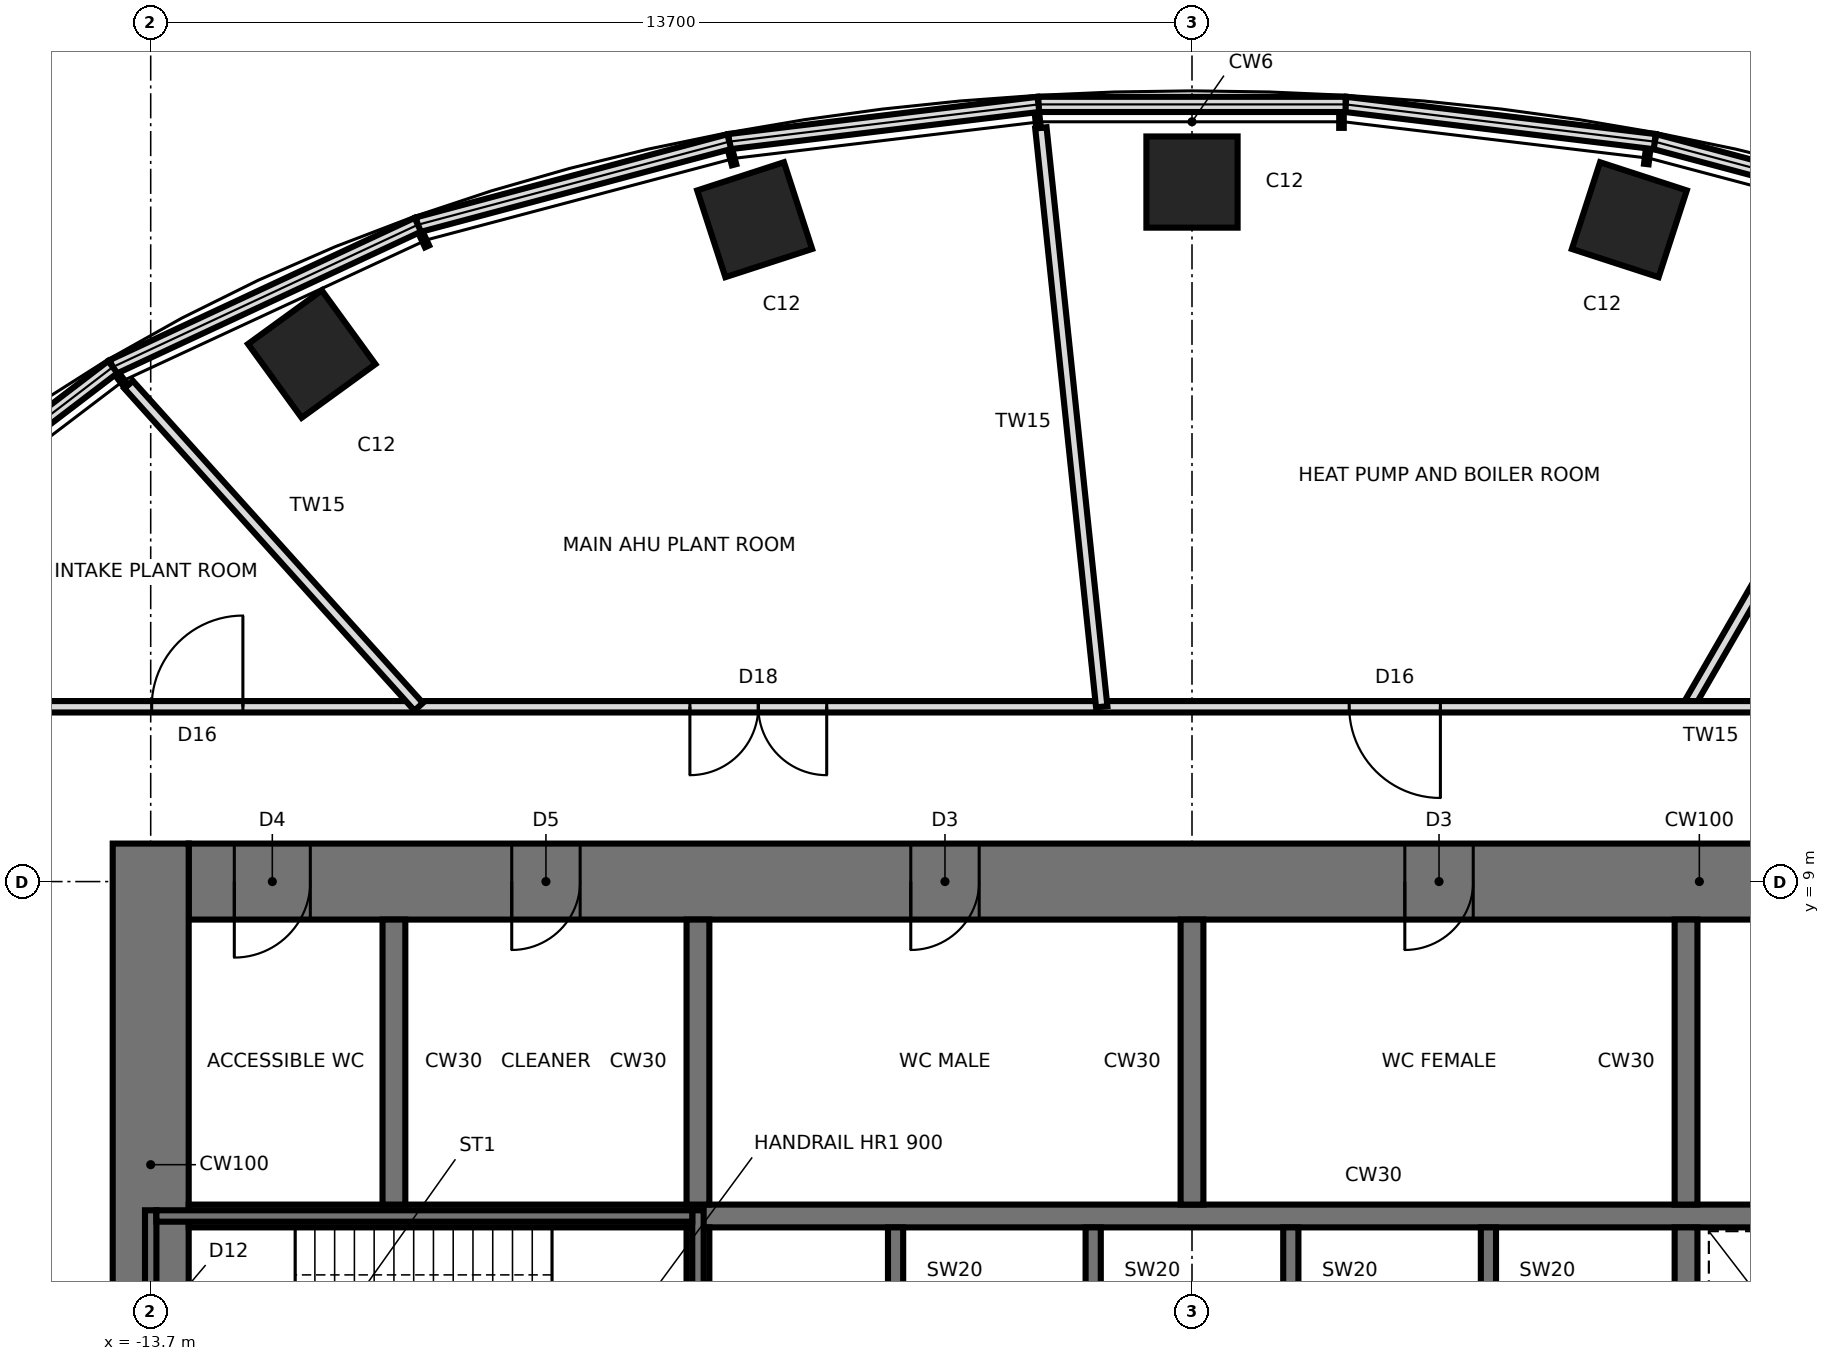
"""IFC4 building model, lengths in metres.
Left out: names, types, materials, properties, quantities, classifications, styles, units other than length and angle.
Written with IfcOpenShell. Run it as: python <this file> out.ifc"""

import sys

from ifc_helpers import new_model, si_unit, direction, frame, frame_2d, origin, origin_2d, place, context, subcontext, project, spatial, rectangle, extrude, element, fill, save


model = new_model("IFC4")
c1 = context("Model", 3, precision=1e-05, world=origin(), true_north=direction((0.0, 1.0)))
c2 = subcontext(c1, "Body", "Model", "MODEL_VIEW")
j1 = project(units=[si_unit("LENGTHUNIT", "METRE"), si_unit("PLANEANGLEUNIT", "RADIAN")], contexts=[c1])
p1 = place(None, origin())
s1 = spatial("IfcSite", under=j1, at=p1, CompositionType="ELEMENT")
p2 = place(p1, origin())
s2 = spatial("IfcBuilding", under=s1, at=p2, CompositionType="ELEMENT")
p3 = place(p2, frame((0.0, 0.0, 277.0)))
s3 = spatial("IfcBuildingStorey", under=s2, at=p3, CompositionType="ELEMENT", Elevation=277.0)
for number, where, z_axis, x_axis in (
    (1, (5.754, 17.708, 0.0), (0.0, 0.0, 1.0), (0.309, 0.951, 0.0)),
    (2, (0.0, 18.204, 0.0), (0.0, 0.0, 1.0), (0.0, 1.0, 0.0)),
    (3, (-5.754, 17.708, 0.0), (0.0, 0.0, 1.0), (-0.309, 0.951, 0.0)),
    (4, (-11.581, 15.94, 0.0), (0.0, 0.0, 1.0), (-0.588, 0.809, 0.0)),
):
    element("IfcColumn", number, at=place(p3, frame(where, z_axis=z_axis, x_axis=x_axis)), inside=s3, PredefinedType="COLUMN", context=c2, shape_type="SweptSolid", body=[
        extrude(rectangle(XDim=1.2, YDim=1.2, at=origin_2d()), origin(), (0.0, 0.0, 1.0), 5.0),
    ])
p4 = place(p3, frame((13.2, 9.0, 0.0), z_axis=(0.0, 0.0, 1.0), x_axis=(-1.0, 0.0, 0.0)))
e5 = element("IfcWall", 5, at=p4, inside=s3, PredefinedType="SHEAR", context=c2, shape_type="SweptSolid", body=[
    extrude(rectangle(XDim=26.4, YDim=1.0, at=frame_2d((13.2, 0.0))), origin(), (0.0, 0.0, 1.0), 5.0),
])
p5 = place(p4, frame((2.65, 0.0, 0.0)))
e6 = element("IfcOpeningElement", 6, at=p5, cuts=e5, PredefinedType="OPENING", context=c2, shape_type="SweptSolid", body=[
    extrude(rectangle(XDim=0.9, YDim=2.1, at=frame_2d((0.45, 1.05))), frame((0.0, 0.51, 0.0), z_axis=(0.0, -1.0, 0.0), x_axis=(1.0, 0.0, 0.0)), (0.0, 0.0, 1.0), 1.02),
])
p6 = place(p4, frame((9.5, 0.0, 0.0)))
e7 = element("IfcOpeningElement", 7, at=p6, cuts=e5, PredefinedType="OPENING", context=c2, shape_type="SweptSolid", body=[
    extrude(rectangle(XDim=0.9, YDim=2.1, at=frame_2d((0.45, 1.05))), frame((0.0, 0.51, 0.0), z_axis=(0.0, -1.0, 0.0), x_axis=(1.0, 0.0, 0.0)), (0.0, 0.0, 1.0), 1.02),
])
p7 = place(p4, frame((16.0, 0.0, 0.0)))
e8 = element("IfcOpeningElement", 8, at=p7, cuts=e5, PredefinedType="OPENING", context=c2, shape_type="SweptSolid", body=[
    extrude(rectangle(XDim=0.9, YDim=2.1, at=frame_2d((0.45, 1.05))), frame((0.0, 0.51, 0.0), z_axis=(0.0, -1.0, 0.0), x_axis=(1.0, 0.0, 0.0)), (0.0, 0.0, 1.0), 1.02),
])
p8 = place(p4, frame((21.25, 0.0, 0.0)))
e9 = element("IfcOpeningElement", 9, at=p8, cuts=e5, PredefinedType="OPENING", context=c2, shape_type="SweptSolid", body=[
    extrude(rectangle(XDim=0.9, YDim=2.1, at=frame_2d((0.45, 1.05))), frame((0.0, 0.51, 0.0), z_axis=(0.0, -1.0, 0.0), x_axis=(1.0, 0.0, 0.0)), (0.0, 0.0, 1.0), 1.02),
])
p9 = place(p4, frame((24.8, 0.0, 0.0)))
e10 = element("IfcOpeningElement", 10, at=p9, cuts=e5, PredefinedType="OPENING", context=c2, shape_type="SweptSolid", body=[
    extrude(rectangle(XDim=1.0, YDim=2.1, at=frame_2d((0.5, 1.05))), frame((0.0, 0.51, 0.0), z_axis=(0.0, -1.0, 0.0), x_axis=(1.0, 0.0, 0.0)), (0.0, 0.0, 1.0), 1.02),
])
p10 = place(p3, frame((-13.7, 9.5, 0.0), z_axis=(0.0, 0.0, 1.0), x_axis=(0.0, -1.0, 0.0)))
e11 = element("IfcWall", 11, at=p10, inside=s3, PredefinedType="SHEAR", context=c2, shape_type="SweptSolid", body=[
    extrude(rectangle(XDim=19.0, YDim=1.0, at=frame_2d((9.5, 0.0))), origin(), (0.0, 0.0, 1.0), 5.0),
])
p11 = place(p10, frame((8.6, 0.0, 0.0)))
e12 = element("IfcOpeningElement", 12, at=p11, cuts=e11, PredefinedType="OPENING", context=c2, shape_type="SweptSolid", body=[
    extrude(rectangle(XDim=1.8, YDim=2.4, at=frame_2d((0.9, 1.2))), frame((0.0, 0.51, 0.0), z_axis=(0.0, -1.0, 0.0), x_axis=(1.0, 0.0, 0.0)), (0.0, 0.0, 1.0), 1.02),
])
p12 = place(p3, frame((-13.2, 4.6, 0.0), z_axis=(0.0, 0.0, 1.0), x_axis=(1.0, 0.0, 0.0)))
e13 = element("IfcWall", 13, at=p12, inside=s3, PredefinedType="SHEAR", context=c2, shape_type="SweptSolid", body=[
    extrude(rectangle(XDim=26.4, YDim=0.3, at=frame_2d((13.2, 0.0))), origin(), (0.0, 0.0, 1.0), 5.0),
])
p13 = place(p3, frame((-6.5, 1.75, 0.0), z_axis=(0.0, 0.0, 1.0), x_axis=(0.0, 1.0, 0.0)))
e14 = element("IfcWall", 14, at=p13, inside=s3, PredefinedType="SHEAR", context=c2, shape_type="SweptSolid", body=[
    extrude(rectangle(XDim=2.7, YDim=0.3, at=frame_2d((1.35, 0.0))), origin(), (0.0, 0.0, 1.0), 5.0),
])
p14 = place(p3, frame((-6.5, 4.75, 0.0), z_axis=(0.0, 0.0, 1.0), x_axis=(0.0, 1.0, 0.0)))
e15 = element("IfcWall", 15, at=p14, inside=s3, PredefinedType="SHEAR", context=c2, shape_type="SweptSolid", body=[
    extrude(rectangle(XDim=3.75, YDim=0.3, at=frame_2d((1.875, 0.0))), origin(), (0.0, 0.0, 1.0), 5.0),
])
p15 = place(p3, frame((6.5, 1.75, 0.0), z_axis=(0.0, 0.0, 1.0), x_axis=(0.0, 1.0, 0.0)))
e16 = element("IfcWall", 16, at=p15, inside=s3, PredefinedType="SHEAR", context=c2, shape_type="SweptSolid", body=[
    extrude(rectangle(XDim=2.7, YDim=0.3, at=frame_2d((1.35, 0.0))), origin(), (0.0, 0.0, 1.0), 5.0),
])
p16 = place(p3, frame((6.5, 4.75, 0.0), z_axis=(0.0, 0.0, 1.0), x_axis=(0.0, 1.0, 0.0)))
e17 = element("IfcWall", 17, at=p16, inside=s3, PredefinedType="SHEAR", context=c2, shape_type="SweptSolid", body=[
    extrude(rectangle(XDim=3.75, YDim=0.3, at=frame_2d((1.875, 0.0))), origin(), (0.0, 0.0, 1.0), 5.0),
])
for number, where, z_axis, x_axis in (
    (18, (-3.9, 1.75, 0.0), (0.0, 0.0, 1.0), (0.0, 1.0, 0.0)),
    (19, (-1.3, 1.75, 0.0), (0.0, 0.0, 1.0), (0.0, 1.0, 0.0)),
    (20, (1.3, 1.75, 0.0), (0.0, 0.0, 1.0), (0.0, 1.0, 0.0)),
    (21, (3.9, 1.75, 0.0), (0.0, 0.0, 1.0), (0.0, 1.0, 0.0)),
):
    element("IfcWall", number, at=place(p3, frame(where, z_axis=z_axis, x_axis=x_axis)), inside=s3, PredefinedType="SHEAR", context=c2, shape_type="SweptSolid", body=[
        extrude(rectangle(XDim=2.7, YDim=0.2, at=frame_2d((1.35, 0.0))), origin(), (0.0, 0.0, 1.0), 5.0),
    ])
for number, where, z_axis, x_axis in (
    (22, (0.0, 4.75, 0.0), (0.0, 0.0, 1.0), (0.0, 1.0, 0.0)),
    (23, (-10.5, 4.75, 0.0), (0.0, 0.0, 1.0), (0.0, 1.0, 0.0)),
):
    element("IfcWall", number, at=place(p3, frame(where, z_axis=z_axis, x_axis=x_axis)), inside=s3, PredefinedType="SHEAR", context=c2, shape_type="SweptSolid", body=[
        extrude(rectangle(XDim=3.75, YDim=0.3, at=frame_2d((1.875, 0.0))), origin(), (0.0, 0.0, 1.0), 5.0),
    ])
p17 = place(p3, frame((10.186, 17.642, 5.0), z_axis=(0.0, 0.0, 1.0), x_axis=(-0.96617759257, 0.257877605881, 0.0)))
e24 = element("IfcWall", 24, at=p17, inside=s3, PredefinedType="PARAPET", context=c2, shape_type="SweptSolid", body=[
    extrude(rectangle(XDim=4.241, YDim=0.2, at=frame_2d((2.121, 0.0))), origin(), (0.0, 0.0, 1.0), 0.4),
])
p18 = place(p3, frame((6.088, 18.736, 5.0), z_axis=(0.0, 0.0, 1.0), x_axis=(-0.99282711648, 0.119558842338, 0.0)))
e25 = element("IfcWall", 25, at=p18, inside=s3, PredefinedType="PARAPET", context=c2, shape_type="SweptSolid", body=[
    extrude(rectangle(XDim=4.096, YDim=0.2, at=frame_2d((2.048, 0.0))), origin(), (0.0, 0.0, 1.0), 0.4),
])
p19 = place(p3, frame((2.021, 19.226, 5.0), z_axis=(0.0, 0.0, 1.0), x_axis=(-1.0, 0.0, 0.0)))
e26 = element("IfcWall", 26, at=p19, inside=s3, PredefinedType="PARAPET", context=c2, shape_type="SweptSolid", body=[
    extrude(rectangle(XDim=4.042, YDim=0.2, at=frame_2d((2.021, 0.0))), origin(), (0.0, 0.0, 1.0), 0.4),
])
p20 = place(p3, frame((-2.021, 19.226, 5.0), z_axis=(0.0, 0.0, 1.0), x_axis=(-0.99282711648, -0.119558842338, 0.0)))
e27 = element("IfcWall", 27, at=p20, inside=s3, PredefinedType="PARAPET", context=c2, shape_type="SweptSolid", body=[
    extrude(rectangle(XDim=4.096, YDim=0.2, at=frame_2d((2.048, 0.0))), origin(), (0.0, 0.0, 1.0), 0.4),
])
p21 = place(p3, frame((-6.088, 18.736, 5.0), z_axis=(0.0, 0.0, 1.0), x_axis=(-0.96617759257, -0.257877605881, 0.0)))
e28 = element("IfcWall", 28, at=p21, inside=s3, PredefinedType="PARAPET", context=c2, shape_type="SweptSolid", body=[
    extrude(rectangle(XDim=4.241, YDim=0.2, at=frame_2d((2.121, 0.0))), origin(), (0.0, 0.0, 1.0), 0.4),
])
p22 = place(p3, frame((-10.186, 17.642, 5.0), z_axis=(0.0, 0.0, 1.0), x_axis=(-0.906246502857, -0.422749661217, 0.0)))
e29 = element("IfcWall", 29, at=p22, inside=s3, PredefinedType="PARAPET", context=c2, shape_type="SweptSolid", body=[
    extrude(rectangle(XDim=4.429, YDim=0.2, at=frame_2d((2.214, 0.0))), origin(), (0.0, 0.0, 1.0), 0.4),
])
p23 = place(p3, frame((-14.199, 15.77, 5.0), z_axis=(0.0, 0.0, 1.0), x_axis=(-0.794855686591, -0.606798514743, 0.0)))
e30 = element("IfcWall", 30, at=p23, inside=s3, PredefinedType="PARAPET", context=c2, shape_type="SweptSolid", body=[
    extrude(rectangle(XDim=4.605, YDim=0.2, at=frame_2d((2.302, 0.0))), origin(), (0.0, 0.0, 1.0), 0.4),
])
p24 = place(p3, frame((6.524, 11.3, 0.0), z_axis=(0.0, 0.0, 1.0), x_axis=(0.4999806097, 0.86603659849, 0.0)))
e31 = element("IfcWall", 31, at=p24, inside=s3, PredefinedType="PARTITIONING", context=c2, shape_type="SweptSolid", body=[
    extrude(rectangle(XDim=7.013, YDim=0.15, at=frame_2d((3.506, 0.0))), origin(), (0.0, 0.0, 1.0), 4.75),
])
p25 = place(p3, frame((16.0, 11.3, 0.0), z_axis=(0.0, 0.0, 1.0), x_axis=(-1.0, 0.0, 0.0)))
e32 = element("IfcWall", 32, at=p25, inside=s3, PredefinedType="PARTITIONING", context=c2, shape_type="SweptSolid", body=[
    extrude(rectangle(XDim=32.0, YDim=0.15, at=frame_2d((16.0, 0.0))), origin(), (0.0, 0.0, 1.0), 4.75),
])
p26 = place(p25, frame((3.813, 0.0, 0.0)))
e33 = element("IfcOpeningElement", 33, at=p26, cuts=e32, PredefinedType="OPENING", context=c2, shape_type="SweptSolid", body=[
    extrude(rectangle(XDim=1.8, YDim=2.4, at=frame_2d((0.9, 1.2))), frame((0.0, 0.085, 0.0), z_axis=(0.0, -1.0, 0.0), x_axis=(1.0, 0.0, 0.0)), (0.0, 0.0, 1.0), 0.17),
])
p27 = place(p25, frame((12.732, 0.0, 0.0)))
e34 = element("IfcOpeningElement", 34, at=p27, cuts=e32, PredefinedType="OPENING", context=c2, shape_type="SweptSolid", body=[
    extrude(rectangle(XDim=1.2, YDim=2.1, at=frame_2d((0.6, 1.05))), frame((0.0, 0.085, 0.0), z_axis=(0.0, -1.0, 0.0), x_axis=(1.0, 0.0, 0.0)), (0.0, 0.0, 1.0), 0.17),
])
p28 = place(p25, frame((20.806, 0.0, 0.0)))
e35 = element("IfcOpeningElement", 35, at=p28, cuts=e32, PredefinedType="OPENING", context=c2, shape_type="SweptSolid", body=[
    extrude(rectangle(XDim=1.8, YDim=2.4, at=frame_2d((0.9, 1.2))), frame((0.0, 0.085, 0.0), z_axis=(0.0, -1.0, 0.0), x_axis=(1.0, 0.0, 0.0)), (0.0, 0.0, 1.0), 0.17),
])
p29 = place(p25, frame((28.487, 0.0, 0.0)))
e36 = element("IfcOpeningElement", 36, at=p29, cuts=e32, PredefinedType="OPENING", context=c2, shape_type="SweptSolid", body=[
    extrude(rectangle(XDim=1.2, YDim=2.1, at=frame_2d((0.6, 1.05))), frame((0.0, 0.085, 0.0), z_axis=(0.0, -1.0, 0.0), x_axis=(1.0, 0.0, 0.0)), (0.0, 0.0, 1.0), 0.17),
])
p30 = place(p3, frame((-1.188, 11.3, 0.0), z_axis=(0.0, 0.0, 1.0), x_axis=(-0.10451720061, 0.994523079057, 0.0)))
e37 = element("IfcWall", 37, at=p30, inside=s3, PredefinedType="PARTITIONING", context=c2, shape_type="SweptSolid", body=[
    extrude(rectangle(XDim=7.659, YDim=0.15, at=frame_2d((3.83, 0.0))), origin(), (0.0, 0.0, 1.0), 4.75),
])
p31 = place(p3, frame((-10.175, 11.3, 0.0), z_axis=(0.0, 0.0, 1.0), x_axis=(-0.669139686494, 0.743136649586, 0.0)))
e38 = element("IfcWall", 38, at=p31, inside=s3, PredefinedType="PARTITIONING", context=c2, shape_type="SweptSolid", body=[
    extrude(rectangle(XDim=5.705, YDim=0.15, at=frame_2d((2.852, 0.0))), origin(), (0.0, 0.0, 1.0), 4.75),
])
p32 = place(p3, frame((-13.7, 1.525, 5.0), z_axis=(0.0, 0.0, 1.0), x_axis=(0.0, 1.0, 0.0)))
e39 = element("IfcWall", 39, at=p32, inside=s3, PredefinedType="SOLIDWALL", context=c2, shape_type="SweptSolid", body=[
    extrude(rectangle(XDim=3.15, YDim=0.15, at=frame_2d((1.575, 0.0))), origin(), (0.0, 0.0, 1.0), 2.82),
])
p33 = place(p32, frame((0.975, 0.0, 0.0)))
e40 = element("IfcOpeningElement", 40, at=p33, cuts=e39, PredefinedType="OPENING", context=c2, shape_type="SweptSolid", body=[
    extrude(rectangle(XDim=1.2, YDim=2.1, at=frame_2d((0.6, 1.05))), frame((0.0, 0.085, 0.0), z_axis=(0.0, -1.0, 0.0), x_axis=(1.0, 0.0, 0.0)), (0.0, 0.0, 1.0), 0.17),
])
p34 = place(p3, frame((-6.5, 1.525, 5.0), z_axis=(0.0, 0.0, 1.0), x_axis=(0.0, 1.0, 0.0)))
e41 = element("IfcWall", 41, at=p34, inside=s3, PredefinedType="SOLIDWALL", context=c2, shape_type="SweptSolid", body=[
    extrude(rectangle(XDim=3.15, YDim=0.15, at=frame_2d((1.575, 0.0))), origin(), (0.0, 0.0, 1.0), 2.82),
])
p35 = place(p3, frame((-13.625, 4.6, 5.0), z_axis=(0.0, 0.0, 1.0), x_axis=(1.0, 0.0, 0.0)))
e42 = element("IfcWall", 42, at=p35, inside=s3, PredefinedType="SOLIDWALL", context=c2, shape_type="SweptSolid", body=[
    extrude(rectangle(XDim=7.05, YDim=0.15, at=frame_2d((3.525, 0.0))), origin(), (0.0, 0.0, 1.0), 2.82),
])
p36 = place(p6, origin())
e43 = element("IfcDoor", 43, at=p36, inside=s3, OperationType="SINGLE_SWING_RIGHT", PredefinedType="DOOR", context=c2, shape_type="SweptSolid", body=[
    extrude(rectangle(XDim=0.82, YDim=2.06, at=frame_2d((0.45, 1.03))), frame((0.0, 0.025, 0.0), z_axis=(0.0, -1.0, 0.0), x_axis=(1.0, 0.0, 0.0)), (0.0, 0.0, 1.0), 0.05),
    extrude(rectangle(XDim=0.04, YDim=2.1, at=frame_2d((0.02, 1.05))), frame((0.0, 0.25, 0.0), z_axis=(0.0, -1.0, 0.0), x_axis=(1.0, 0.0, 0.0)), (0.0, 0.0, 1.0), 0.5),
    extrude(rectangle(XDim=0.04, YDim=2.1, at=frame_2d((0.88, 1.05))), frame((0.0, 0.25, 0.0), z_axis=(0.0, -1.0, 0.0), x_axis=(1.0, 0.0, 0.0)), (0.0, 0.0, 1.0), 0.5),
    extrude(rectangle(XDim=0.82, YDim=0.04, at=frame_2d((0.45, 2.08))), frame((0.0, 0.25, 0.0), z_axis=(0.0, -1.0, 0.0), x_axis=(1.0, 0.0, 0.0)), (0.0, 0.0, 1.0), 0.5),
])
fill(e7, e43)
p37 = place(p7, origin())
e44 = element("IfcDoor", 44, at=p37, inside=s3, OperationType="SINGLE_SWING_RIGHT", PredefinedType="DOOR", context=c2, shape_type="SweptSolid", body=[
    extrude(rectangle(XDim=0.82, YDim=2.06, at=frame_2d((0.45, 1.03))), frame((0.0, 0.025, 0.0), z_axis=(0.0, -1.0, 0.0), x_axis=(1.0, 0.0, 0.0)), (0.0, 0.0, 1.0), 0.05),
    extrude(rectangle(XDim=0.04, YDim=2.1, at=frame_2d((0.02, 1.05))), frame((0.0, 0.25, 0.0), z_axis=(0.0, -1.0, 0.0), x_axis=(1.0, 0.0, 0.0)), (0.0, 0.0, 1.0), 0.5),
    extrude(rectangle(XDim=0.04, YDim=2.1, at=frame_2d((0.88, 1.05))), frame((0.0, 0.25, 0.0), z_axis=(0.0, -1.0, 0.0), x_axis=(1.0, 0.0, 0.0)), (0.0, 0.0, 1.0), 0.5),
    extrude(rectangle(XDim=0.82, YDim=0.04, at=frame_2d((0.45, 2.08))), frame((0.0, 0.25, 0.0), z_axis=(0.0, -1.0, 0.0), x_axis=(1.0, 0.0, 0.0)), (0.0, 0.0, 1.0), 0.5),
])
fill(e8, e44)
p38 = place(p8, origin())
e45 = element("IfcDoor", 45, at=p38, inside=s3, OperationType="SINGLE_SWING_RIGHT", PredefinedType="DOOR", context=c2, shape_type="SweptSolid", body=[
    extrude(rectangle(XDim=0.82, YDim=2.06, at=frame_2d((0.45, 1.03))), frame((0.0, 0.025, 0.0), z_axis=(0.0, -1.0, 0.0), x_axis=(1.0, 0.0, 0.0)), (0.0, 0.0, 1.0), 0.05),
    extrude(rectangle(XDim=0.04, YDim=2.1, at=frame_2d((0.02, 1.05))), frame((0.0, 0.25, 0.0), z_axis=(0.0, -1.0, 0.0), x_axis=(1.0, 0.0, 0.0)), (0.0, 0.0, 1.0), 0.5),
    extrude(rectangle(XDim=0.04, YDim=2.1, at=frame_2d((0.88, 1.05))), frame((0.0, 0.25, 0.0), z_axis=(0.0, -1.0, 0.0), x_axis=(1.0, 0.0, 0.0)), (0.0, 0.0, 1.0), 0.5),
    extrude(rectangle(XDim=0.82, YDim=0.04, at=frame_2d((0.45, 2.08))), frame((0.0, 0.25, 0.0), z_axis=(0.0, -1.0, 0.0), x_axis=(1.0, 0.0, 0.0)), (0.0, 0.0, 1.0), 0.5),
])
fill(e9, e45)
p39 = place(p9, origin())
e46 = element("IfcDoor", 46, at=p39, inside=s3, OperationType="SINGLE_SWING_RIGHT", PredefinedType="DOOR", context=c2, shape_type="SweptSolid", body=[
    extrude(rectangle(XDim=0.92, YDim=2.06, at=frame_2d((0.5, 1.03))), frame((0.0, 0.025, 0.0), z_axis=(0.0, -1.0, 0.0), x_axis=(1.0, 0.0, 0.0)), (0.0, 0.0, 1.0), 0.05),
    extrude(rectangle(XDim=0.04, YDim=2.1, at=frame_2d((0.02, 1.05))), frame((0.0, 0.25, 0.0), z_axis=(0.0, -1.0, 0.0), x_axis=(1.0, 0.0, 0.0)), (0.0, 0.0, 1.0), 0.5),
    extrude(rectangle(XDim=0.04, YDim=2.1, at=frame_2d((0.98, 1.05))), frame((0.0, 0.25, 0.0), z_axis=(0.0, -1.0, 0.0), x_axis=(1.0, 0.0, 0.0)), (0.0, 0.0, 1.0), 0.5),
    extrude(rectangle(XDim=0.92, YDim=0.04, at=frame_2d((0.5, 2.08))), frame((0.0, 0.25, 0.0), z_axis=(0.0, -1.0, 0.0), x_axis=(1.0, 0.0, 0.0)), (0.0, 0.0, 1.0), 0.5),
])
fill(e10, e46)
p40 = place(p27, origin())
e47 = element("IfcDoor", 47, at=p40, inside=s3, OperationType="SINGLE_SWING_LEFT", PredefinedType="DOOR", context=c2, shape_type="SweptSolid", body=[
    extrude(rectangle(XDim=1.2, YDim=2.1, at=frame_2d((0.6, 1.05))), frame((0.0, 0.025, 0.0), z_axis=(0.0, -1.0, 0.0), x_axis=(1.0, 0.0, 0.0)), (0.0, 0.0, 1.0), 0.05),
])
fill(e34, e47)
p41 = place(p28, origin())
e48 = element("IfcDoor", 48, at=p41, inside=s3, OperationType="DOUBLE_DOOR_SINGLE_SWING", PredefinedType="DOOR", context=c2, shape_type="SweptSolid", body=[
    extrude(rectangle(XDim=1.8, YDim=2.4, at=frame_2d((0.9, 1.2))), frame((0.0, 0.025, 0.0), z_axis=(0.0, -1.0, 0.0), x_axis=(1.0, 0.0, 0.0)), (0.0, 0.0, 1.0), 0.05),
])
fill(e35, e48)
p42 = place(p29, frame((1.2, 0.0, 0.0), z_axis=(0.0, 0.0, 1.0), x_axis=(-1.0, 0.0, 0.0)))
e49 = element("IfcDoor", 49, at=p42, inside=s3, OperationType="SINGLE_SWING_RIGHT", PredefinedType="DOOR", context=c2, shape_type="SweptSolid", body=[
    extrude(rectangle(XDim=1.2, YDim=2.1, at=frame_2d((0.6, 1.05))), frame((0.0, 0.025, 0.0), z_axis=(0.0, -1.0, 0.0), x_axis=(1.0, 0.0, 0.0)), (0.0, 0.0, 1.0), 0.05),
])
fill(e36, e49)
save(model, sys.argv[1])
